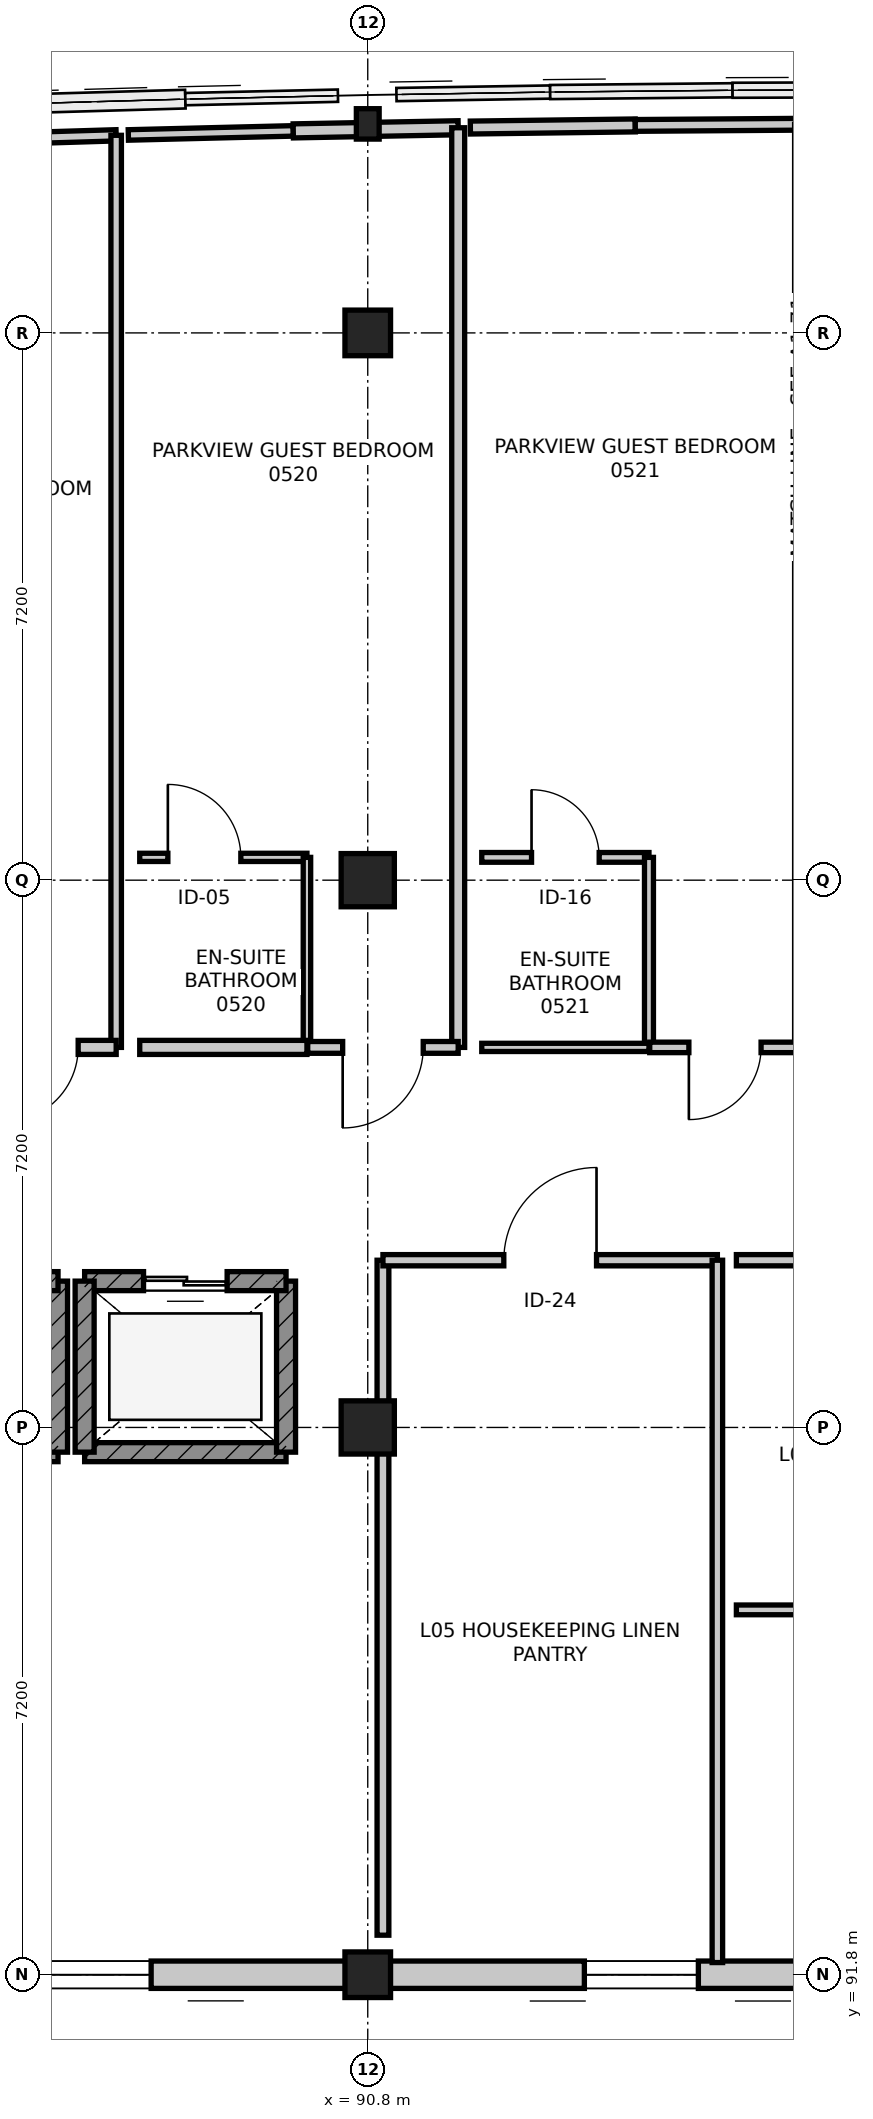
"""IFC4 building model, lengths in metres.
Left out: names, types, materials, properties, quantities, classifications, styles, units other than length and angle.
Written with IfcOpenShell. Run it as: python <this file> out.ifc"""

import sys

from ifc_helpers import new_model, si_unit, direction, frame, frame_2d, origin, origin_2d, place, context, subcontext, project, spatial, rectangle, i_section, extrude, element, fill, save


model = new_model("IFC4")
c1 = context("Model", 3, precision=1e-05, world=origin(), true_north=direction((0.0, 1.0)))
c2 = subcontext(c1, "Body", "Model", "MODEL_VIEW")
j1 = project(units=[si_unit("LENGTHUNIT", "METRE"), si_unit("PLANEANGLEUNIT", "RADIAN")], contexts=[c1])
p1 = place(None, origin())
s1 = spatial("IfcSite", under=j1, at=p1, CompositionType="ELEMENT")
p2 = place(p1, origin())
s2 = spatial("IfcBuilding", under=s1, at=p2, CompositionType="ELEMENT")
p3 = place(p2, frame((0.0, 0.0, 22.8)))
s3 = spatial("IfcBuildingStorey", under=s2, at=p3, CompositionType="ELEMENT", Elevation=22.8)
p4 = place(p3, frame((90.8, 91.8, 0.0), z_axis=(0.0, 0.0, 1.0), x_axis=(1.0, 0.0, 0.0)))
e1 = element("IfcColumn", 1, at=p4, inside=s3, PredefinedType="COLUMN", context=c2, shape_type="SweptSolid", body=[
    extrude(rectangle(XDim=0.6, YDim=0.6, at=origin_2d()), origin(), (0.0, 0.0, 1.0), 3.6),
])
for number, where, z_axis, x_axis in (
    (2, (90.8, 99.0, 0.0), (0.0, 0.0, 1.0), (1.0, 0.0, 0.0)),
    (3, (90.8, 106.2, 0.0), (0.0, 0.0, 1.0), (1.0, 0.0, 0.0)),
):
    element("IfcColumn", number, at=place(p3, frame(where, z_axis=z_axis, x_axis=x_axis)), inside=s3, PredefinedType="COLUMN", context=c2, shape_type="SweptSolid", body=[
        extrude(rectangle(XDim=0.7, YDim=0.7, at=origin_2d()), origin(), (0.0, 0.0, 1.0), 3.6),
    ])
p5 = place(p3, frame((90.8, 113.4, 0.0), z_axis=(0.0, 0.0, 1.0), x_axis=(1.0, 0.0, 0.0)))
e4 = element("IfcColumn", 4, at=p5, inside=s3, PredefinedType="COLUMN", context=c2, shape_type="SweptSolid", body=[
    extrude(rectangle(XDim=0.6, YDim=0.6, at=origin_2d()), origin(), (0.0, 0.0, 1.0), 3.6),
])
p6 = place(p3, frame((90.8, 116.15, 0.0), z_axis=(0.0, 0.0, 1.0), x_axis=(1.0, 0.0, 0.0)))
e5 = element("IfcColumn", 5, at=p6, inside=s3, PredefinedType="COLUMN", context=c2, shape_type="SweptSolid", body=[
    extrude(i_section(OverallWidth=0.3, OverallDepth=0.4, WebThickness=0.013, FlangeThickness=0.024, FilletRadius=0.027, at=origin_2d()), origin(), (0.0, 0.0, 1.0), 3.6),
])
p7 = place(p3, frame((98.0, 91.8, 0.0), z_axis=(0.0, 0.0, 1.0), x_axis=(-1.0, 0.0, 0.0)))
e6 = element("IfcWall", 6, at=p7, inside=s3, PredefinedType="STANDARD", context=c2, shape_type="SweptSolid", body=[
    extrude(rectangle(XDim=7.2, YDim=0.36, at=frame_2d((3.6, 0.0))), origin(), (0.0, 0.0, 1.0), 2.735),
])
p8 = place(p7, frame((2.85, 0.0, 0.75)))
e7 = element("IfcOpeningElement", 7, at=p8, cuts=e6, PredefinedType="OPENING", context=c2, shape_type="SweptSolid", body=[
    extrude(rectangle(XDim=1.5, YDim=1.5, at=frame_2d((0.75, 0.75))), frame((0.0, 0.19, 0.0), z_axis=(0.0, -1.0, 0.0), x_axis=(1.0, 0.0, 0.0)), (0.0, 0.0, 1.0), 0.38),
])
p9 = place(p3, frame((90.8, 91.8, 0.0), z_axis=(0.0, 0.0, 1.0), x_axis=(-1.0, 0.0, 0.0)))
e8 = element("IfcWall", 8, at=p9, inside=s3, PredefinedType="STANDARD", context=c2, shape_type="SweptSolid", body=[
    extrude(rectangle(XDim=7.2, YDim=0.36, at=frame_2d((3.6, 0.0))), origin(), (0.0, 0.0, 1.0), 2.735),
])
p10 = place(p9, frame((2.85, 0.0, 0.75)))
e9 = element("IfcOpeningElement", 9, at=p10, cuts=e8, PredefinedType="OPENING", context=c2, shape_type="SweptSolid", body=[
    extrude(rectangle(XDim=1.5, YDim=1.5, at=frame_2d((0.75, 0.75))), frame((0.0, 0.19, 0.0), z_axis=(0.0, -1.0, 0.0), x_axis=(1.0, 0.0, 0.0)), (0.0, 0.0, 1.0), 0.38),
])
p11 = place(p3, frame((84.075, 98.675, 0.0), z_axis=(0.0, 0.0, 1.0), x_axis=(1.0, 0.0, 0.0)))
e10 = element("IfcWall", 10, at=p11, inside=s3, PredefinedType="SHEAR", context=c2, shape_type="SweptSolid", body=[
    extrude(rectangle(XDim=2.65, YDim=0.25, at=frame_2d((1.325, 0.0))), origin(), (0.0, 0.0, 1.0), 3.35),
])
p12 = place(p3, frame((86.725, 98.675, 0.0), z_axis=(0.0, 0.0, 1.0), x_axis=(0.0, 1.0, 0.0)))
e11 = element("IfcWall", 11, at=p12, inside=s3, PredefinedType="SHEAR", context=c2, shape_type="SweptSolid", body=[
    extrude(rectangle(XDim=2.25, YDim=0.25, at=frame_2d((1.125, 0.0))), origin(), (0.0, 0.0, 1.0), 3.35),
])
p13 = place(p3, frame((86.725, 100.925, 0.0), z_axis=(0.0, 0.0, 1.0), x_axis=(-1.0, 0.0, 0.0)))
e12 = element("IfcWall", 12, at=p13, inside=s3, PredefinedType="SHEAR", context=c2, shape_type="SweptSolid", body=[
    extrude(rectangle(XDim=2.65, YDim=0.25, at=frame_2d((1.325, 0.0))), origin(), (0.0, 0.0, 1.0), 3.35),
])
p14 = place(p13, frame((0.775, 0.0, 0.0)))
e13 = element("IfcOpeningElement", 13, at=p14, cuts=e12, PredefinedType="OPENING", context=c2, shape_type="SweptSolid", body=[
    extrude(rectangle(XDim=1.1, YDim=2.15, at=frame_2d((0.55, 1.075))), frame((0.0, 0.135, 0.0), z_axis=(0.0, -1.0, 0.0), x_axis=(1.0, 0.0, 0.0)), (0.0, 0.0, 1.0), 0.27),
])
p15 = place(p3, frame((87.075, 98.675, 0.0), z_axis=(0.0, 0.0, 1.0), x_axis=(1.0, 0.0, 0.0)))
e14 = element("IfcWall", 14, at=p15, inside=s3, PredefinedType="SHEAR", context=c2, shape_type="SweptSolid", body=[
    extrude(rectangle(XDim=2.65, YDim=0.25, at=frame_2d((1.325, 0.0))), origin(), (0.0, 0.0, 1.0), 3.35),
])
p16 = place(p3, frame((89.725, 98.675, 0.0), z_axis=(0.0, 0.0, 1.0), x_axis=(0.0, 1.0, 0.0)))
e15 = element("IfcWall", 15, at=p16, inside=s3, PredefinedType="SHEAR", context=c2, shape_type="SweptSolid", body=[
    extrude(rectangle(XDim=2.25, YDim=0.25, at=frame_2d((1.125, 0.0))), origin(), (0.0, 0.0, 1.0), 3.35),
])
p17 = place(p3, frame((89.725, 100.925, 0.0), z_axis=(0.0, 0.0, 1.0), x_axis=(-1.0, 0.0, 0.0)))
e16 = element("IfcWall", 16, at=p17, inside=s3, PredefinedType="SHEAR", context=c2, shape_type="SweptSolid", body=[
    extrude(rectangle(XDim=2.65, YDim=0.25, at=frame_2d((1.325, 0.0))), origin(), (0.0, 0.0, 1.0), 3.35),
])
p18 = place(p17, frame((0.775, 0.0, 0.0)))
e17 = element("IfcOpeningElement", 17, at=p18, cuts=e16, PredefinedType="OPENING", context=c2, shape_type="SweptSolid", body=[
    extrude(rectangle(XDim=1.1, YDim=2.15, at=frame_2d((0.55, 1.075))), frame((0.0, 0.135, 0.0), z_axis=(0.0, -1.0, 0.0), x_axis=(1.0, 0.0, 0.0)), (0.0, 0.0, 1.0), 0.27),
])
p19 = place(p3, frame((87.075, 100.925, 0.0), z_axis=(0.0, 0.0, 1.0), x_axis=(0.0, -1.0, 0.0)))
e18 = element("IfcWall", 18, at=p19, inside=s3, PredefinedType="SHEAR", context=c2, shape_type="SweptSolid", body=[
    extrude(rectangle(XDim=2.25, YDim=0.25, at=frame_2d((1.125, 0.0))), origin(), (0.0, 0.0, 1.0), 3.35),
])
p20 = place(p3, frame((91.0, 92.32, 0.0), z_axis=(0.0, 0.0, 1.0), x_axis=(0.0, 1.0, 0.0)))
e19 = element("IfcWall", 19, at=p20, inside=s3, PredefinedType="PARTITIONING", context=c2, shape_type="SweptSolid", body=[
    extrude(rectangle(XDim=8.88, YDim=0.155, at=frame_2d((4.44, 0.0))), origin(), (0.0, 0.0, 1.0), 2.685),
])
p21 = place(p3, frame((91.0, 101.2, 0.0), z_axis=(0.0, 0.0, 1.0), x_axis=(1.0, 0.0, 0.0)))
e20 = element("IfcWall", 20, at=p21, inside=s3, PredefinedType="PARTITIONING", context=c2, shape_type="SweptSolid", body=[
    extrude(rectangle(XDim=4.4, YDim=0.148, at=frame_2d((2.2, 0.0))), origin(), (0.0, 0.0, 1.0), 2.685),
])
p22 = place(p21, frame((1.59, 0.0, 0.0)))
e21 = element("IfcOpeningElement", 21, at=p22, cuts=e20, PredefinedType="OPENING", context=c2, shape_type="SweptSolid", body=[
    extrude(rectangle(XDim=1.22, YDim=2.24, at=frame_2d((0.61, 1.12))), frame((0.0, 0.084, 0.0), z_axis=(0.0, -1.0, 0.0), x_axis=(1.0, 0.0, 0.0)), (0.0, 0.0, 1.0), 0.168),
])
p23 = place(p3, frame((95.4, 101.2, 0.0), z_axis=(0.0, 0.0, 1.0), x_axis=(0.0, -1.0, 0.0)))
e22 = element("IfcWall", 22, at=p23, inside=s3, PredefinedType="PARTITIONING", context=c2, shape_type="SweptSolid", body=[
    extrude(rectangle(XDim=9.24, YDim=0.138, at=frame_2d((4.62, 0.0))), origin(), (0.0, 0.0, 1.0), 2.735),
])
p24 = place(p3, frame((95.65, 101.2, 0.0), z_axis=(0.0, 0.0, 1.0), x_axis=(1.0, 0.0, 0.0)))
e23 = element("IfcWall", 23, at=p24, inside=s3, PredefinedType="PARTITIONING", context=c2, shape_type="SweptSolid", body=[
    extrude(rectangle(XDim=3.25, YDim=0.148, at=frame_2d((1.625, 0.0))), origin(), (0.0, 0.0, 1.0), 2.685),
])
p25 = place(p24, frame((0.945, 0.0, 0.0)))
e24 = element("IfcOpeningElement", 24, at=p25, cuts=e23, PredefinedType="OPENING", context=c2, shape_type="SweptSolid", body=[
    extrude(rectangle(XDim=1.36, YDim=2.22, at=frame_2d((0.68, 1.11))), frame((0.0, 0.084, 0.0), z_axis=(0.0, -1.0, 0.0), x_axis=(1.0, 0.0, 0.0)), (0.0, 0.0, 1.0), 0.168),
])
p26 = place(p3, frame((98.9, 96.6, 0.0), z_axis=(0.0, 0.0, 1.0), x_axis=(-1.0, 0.0, 0.0)))
e25 = element("IfcWall", 25, at=p26, inside=s3, PredefinedType="PARTITIONING", context=c2, shape_type="SweptSolid", body=[
    extrude(rectangle(XDim=3.25, YDim=0.128, at=frame_2d((1.625, 0.0))), origin(), (0.0, 0.0, 1.0), 2.685),
])
p27 = place(p3, frame((85.32, 115.933, 0.0), z_axis=(0.0, 0.0, 1.0), x_axis=(0.999535487068, 0.030476385801, 0.0)))
e26 = element("IfcWall", 26, at=p27, inside=s3, PredefinedType="PARTITIONING", context=c2, shape_type="SweptSolid", body=[
    extrude(rectangle(XDim=2.171, YDim=0.148, at=frame_2d((1.085, 0.0))), origin(), (0.0, 0.0, 1.0), 2.926),
])
p28 = place(p3, frame((87.49, 116.0, 0.0), z_axis=(0.0, 0.0, 1.0), x_axis=(0.0, -1.0, 0.0)))
e27 = element("IfcWall", 27, at=p28, inside=s3, PredefinedType="PARTITIONING", context=c2, shape_type="SweptSolid", body=[
    extrude(rectangle(XDim=12.0, YDim=0.138, at=frame_2d((6.0, 0.0))), origin(), (0.0, 0.0, 1.0), 2.735),
])
p29 = place(p3, frame((87.49, 104.0, 0.0), z_axis=(0.0, 0.0, 1.0), x_axis=(-1.0, 0.0, 0.0)))
e28 = element("IfcWall", 28, at=p29, inside=s3, PredefinedType="PARTITIONING", context=c2, shape_type="SweptSolid", body=[
    extrude(rectangle(XDim=1.98, YDim=0.185, at=frame_2d((0.99, 0.0))), origin(), (0.0, 0.0, 1.0), 3.35),
])
p30 = place(p29, frame((0.5, 0.0, 0.0)))
e29 = element("IfcOpeningElement", 29, at=p30, cuts=e28, PredefinedType="OPENING", context=c2, shape_type="SweptSolid", body=[
    extrude(rectangle(XDim=0.98, YDim=2.15, at=frame_2d((0.49, 1.075))), frame((0.0, 0.103, 0.0), z_axis=(0.0, -1.0, 0.0), x_axis=(1.0, 0.0, 0.0)), (0.0, 0.0, 1.0), 0.205),
])
p31 = place(p3, frame((87.8, 106.5, 0.0), z_axis=(0.0, 0.0, 1.0), x_axis=(1.0, 0.0, 0.0)))
e30 = element("IfcWall", 30, at=p31, inside=s3, PredefinedType="PARTITIONING", context=c2, shape_type="SweptSolid", body=[
    extrude(rectangle(XDim=2.2, YDim=0.108, at=frame_2d((1.1, 0.0))), origin(), (0.0, 0.0, 1.0), 3.35),
])
p32 = place(p31, frame((0.37, 0.0, 0.0)))
e31 = element("IfcOpeningElement", 31, at=p32, cuts=e30, PredefinedType="OPENING", context=c2, shape_type="SweptSolid", body=[
    extrude(rectangle(XDim=0.96, YDim=2.14, at=frame_2d((0.48, 1.07))), frame((0.0, 0.064, 0.0), z_axis=(0.0, -1.0, 0.0), x_axis=(1.0, 0.0, 0.0)), (0.0, 0.0, 1.0), 0.128),
])
p33 = place(p3, frame((90.0, 106.5, 0.0), z_axis=(0.0, 0.0, 1.0), x_axis=(0.0, -1.0, 0.0)))
e32 = element("IfcWall", 32, at=p33, inside=s3, PredefinedType="PARTITIONING", context=c2, shape_type="SweptSolid", body=[
    extrude(rectangle(XDim=2.5, YDim=0.098, at=frame_2d((1.25, 0.0))), origin(), (0.0, 0.0, 1.0), 2.735),
])
p34 = place(p3, frame((90.0, 104.0, 0.0), z_axis=(0.0, 0.0, 1.0), x_axis=(-1.0, 0.0, 0.0)))
e33 = element("IfcWall", 33, at=p34, inside=s3, PredefinedType="PARTITIONING", context=c2, shape_type="SweptSolid", body=[
    extrude(rectangle(XDim=2.2, YDim=0.185, at=frame_2d((1.1, 0.0))), origin(), (0.0, 0.0, 1.0), 3.35),
])
p35 = place(p3, frame((87.65, 116.004, 0.0), z_axis=(0.0, 0.0, 1.0), x_axis=(0.999696642479, 0.024629718158, 0.0)))
e34 = element("IfcWall", 34, at=p35, inside=s3, PredefinedType="PARTITIONING", context=c2, shape_type="SweptSolid", body=[
    extrude(rectangle(XDim=2.171, YDim=0.138, at=frame_2d((1.085, 0.0))), origin(), (0.0, 0.0, 1.0), 2.926),
])
p36 = place(p3, frame((89.82, 116.058, 0.0), z_axis=(0.0, 0.0, 1.0), x_axis=(0.999817130779, 0.019123414968, 0.0)))
e35 = element("IfcWall", 35, at=p36, inside=s3, PredefinedType="PARTITIONING", context=c2, shape_type="SweptSolid", body=[
    extrude(rectangle(XDim=2.17, YDim=0.185, at=frame_2d((1.085, 0.0))), origin(), (0.0, 0.0, 1.0), 2.926),
])
p37 = place(p3, frame((91.99, 116.099, 0.0), z_axis=(0.0, 0.0, 1.0), x_axis=(0.0, -1.0, 0.0)))
e36 = element("IfcWall", 36, at=p37, inside=s3, PredefinedType="PARTITIONING", context=c2, shape_type="SweptSolid", body=[
    extrude(rectangle(XDim=12.099, YDim=0.17, at=frame_2d((6.05, 0.0))), origin(), (0.0, 0.0, 1.0), 2.735),
])
p38 = place(p3, frame((91.99, 104.0, 0.0), z_axis=(0.0, 0.0, 1.0), x_axis=(-1.0, 0.0, 0.0)))
e37 = element("IfcWall", 37, at=p38, inside=s3, PredefinedType="PARTITIONING", context=c2, shape_type="SweptSolid", body=[
    extrude(rectangle(XDim=1.98, YDim=0.155, at=frame_2d((0.99, 0.0))), origin(), (0.0, 0.0, 1.0), 2.685),
])
p39 = place(p38, frame((0.46, 0.0, 0.0)))
e38 = element("IfcOpeningElement", 38, at=p39, cuts=e37, PredefinedType="OPENING", context=c2, shape_type="SweptSolid", body=[
    extrude(rectangle(XDim=1.06, YDim=2.2, at=frame_2d((0.53, 1.1))), frame((0.0, 0.087, 0.0), z_axis=(0.0, -1.0, 0.0), x_axis=(1.0, 0.0, 0.0)), (0.0, 0.0, 1.0), 0.175),
])
p40 = place(p3, frame((92.3, 106.5, 0.0), z_axis=(0.0, 0.0, 1.0), x_axis=(1.0, 0.0, 0.0)))
e39 = element("IfcWall", 39, at=p40, inside=s3, PredefinedType="PARTITIONING", context=c2, shape_type="SweptSolid", body=[
    extrude(rectangle(XDim=2.2, YDim=0.128, at=frame_2d((1.1, 0.0))), origin(), (0.0, 0.0, 1.0), 3.35),
])
p41 = place(p40, frame((0.655, 0.0, 0.0)))
e40 = element("IfcOpeningElement", 40, at=p41, cuts=e39, PredefinedType="OPENING", context=c2, shape_type="SweptSolid", body=[
    extrude(rectangle(XDim=0.89, YDim=2.09, at=frame_2d((0.445, 1.045))), frame((0.0, 0.074, 0.0), z_axis=(0.0, -1.0, 0.0), x_axis=(1.0, 0.0, 0.0)), (0.0, 0.0, 1.0), 0.148),
])
p42 = place(p3, frame((94.5, 106.5, 0.0), z_axis=(0.0, 0.0, 1.0), x_axis=(0.0, -1.0, 0.0)))
e41 = element("IfcWall", 41, at=p42, inside=s3, PredefinedType="PARTITIONING", context=c2, shape_type="SweptSolid", body=[
    extrude(rectangle(XDim=2.5, YDim=0.118, at=frame_2d((1.25, 0.0))), origin(), (0.0, 0.0, 1.0), 2.735),
])
p43 = place(p3, frame((94.5, 104.0, 0.0), z_axis=(0.0, 0.0, 1.0), x_axis=(-1.0, 0.0, 0.0)))
e42 = element("IfcWall", 42, at=p43, inside=s3, PredefinedType="PARTITIONING", context=c2, shape_type="SweptSolid", body=[
    extrude(rectangle(XDim=2.2, YDim=0.108, at=frame_2d((1.1, 0.0))), origin(), (0.0, 0.0, 1.0), 3.35),
])
p44 = place(p3, frame((92.15, 116.102, 0.0), z_axis=(0.0, 0.0, 1.0), x_axis=(0.999916323143, 0.012936255727, 0.0)))
e43 = element("IfcWall", 43, at=p44, inside=s3, PredefinedType="PARTITIONING", context=c2, shape_type="SweptSolid", body=[
    extrude(rectangle(XDim=2.17, YDim=0.17, at=frame_2d((1.085, 0.0))), origin(), (0.0, 0.0, 1.0), 2.926),
])
p45 = place(p3, frame((94.32, 116.13, 0.0), z_axis=(0.0, 0.0, 1.0), x_axis=(0.999974879594, 0.007088030762, 0.0)))
e44 = element("IfcWall", 44, at=p45, inside=s3, PredefinedType="PARTITIONING", context=c2, shape_type="SweptSolid", body=[
    extrude(rectangle(XDim=2.17, YDim=0.155, at=frame_2d((1.085, 0.0))), origin(), (0.0, 0.0, 1.0), 2.926),
])
p46 = place(p3, frame((96.49, 104.0, 0.0), z_axis=(0.0, 0.0, 1.0), x_axis=(-1.0, 0.0, 0.0)))
e45 = element("IfcWall", 45, at=p46, inside=s3, PredefinedType="PARTITIONING", context=c2, shape_type="SweptSolid", body=[
    extrude(rectangle(XDim=1.98, YDim=0.138, at=frame_2d((0.99, 0.0))), origin(), (0.0, 0.0, 1.0), 3.35),
])
p47 = place(p46, frame((0.515, 0.0, 0.0)))
e46 = element("IfcOpeningElement", 46, at=p47, cuts=e45, PredefinedType="OPENING", context=c2, shape_type="SweptSolid", body=[
    extrude(rectangle(XDim=0.95, YDim=2.1, at=frame_2d((0.475, 1.05))), frame((0.0, 0.079, 0.0), z_axis=(0.0, -1.0, 0.0), x_axis=(1.0, 0.0, 0.0)), (0.0, 0.0, 1.0), 0.158),
])
p48 = place(p8, origin())
e47 = element("IfcWindow", 47, at=p48, inside=s3, PartitioningType="SINGLE_PANEL", PredefinedType="WINDOW", context=c2, shape_type="SweptSolid", body=[
    extrude(rectangle(XDim=1.5, YDim=1.5, at=frame_2d((0.75, 0.75))), frame((0.0, 0.03, 0.0), z_axis=(0.0, -1.0, 0.0), x_axis=(1.0, 0.0, 0.0)), (0.0, 0.0, 1.0), 0.06),
])
fill(e7, e47)
p49 = place(p10, origin())
e48 = element("IfcWindow", 48, at=p49, inside=s3, PartitioningType="SINGLE_PANEL", PredefinedType="WINDOW", context=c2, shape_type="SweptSolid", body=[
    extrude(rectangle(XDim=1.5, YDim=1.5, at=frame_2d((0.75, 0.75))), frame((0.0, 0.03, 0.0), z_axis=(0.0, -1.0, 0.0), x_axis=(1.0, 0.0, 0.0)), (0.0, 0.0, 1.0), 0.06),
])
fill(e9, e48)
p50 = place(p18, origin())
e49 = element("IfcDoor", 49, at=p50, inside=s3, OperationType="DOUBLE_DOOR_SLIDING", PredefinedType="DOOR", context=c2, shape_type="SweptSolid", body=[
    extrude(rectangle(XDim=1.1, YDim=2.15, at=frame_2d((0.55, 1.075))), frame((0.0, 0.025, 0.0), z_axis=(0.0, -1.0, 0.0), x_axis=(1.0, 0.0, 0.0)), (0.0, 0.0, 1.0), 0.05),
])
fill(e17, e49)
p51 = place(p22, origin())
e50 = element("IfcDoor", 50, at=p51, inside=s3, OperationType="SINGLE_SWING_RIGHT", PredefinedType="DOOR", context=c2, shape_type="SweptSolid", body=[
    extrude(rectangle(XDim=1.22, YDim=2.24, at=frame_2d((0.61, 1.12))), frame((0.0, 0.025, 0.0), z_axis=(0.0, -1.0, 0.0), x_axis=(1.0, 0.0, 0.0)), (0.0, 0.0, 1.0), 0.05),
])
fill(e21, e50)
p52 = place(p30, origin())
e51 = element("IfcDoor", 51, at=p52, inside=s3, OperationType="SINGLE_SWING_RIGHT", PredefinedType="DOOR", context=c2, shape_type="SweptSolid", body=[
    extrude(rectangle(XDim=0.98, YDim=2.15, at=frame_2d((0.49, 1.075))), frame((0.0, 0.025, 0.0), z_axis=(0.0, -1.0, 0.0), x_axis=(1.0, 0.0, 0.0)), (0.0, 0.0, 1.0), 0.05),
])
fill(e29, e51)
p53 = place(p32, origin())
e52 = element("IfcDoor", 52, at=p53, inside=s3, OperationType="SINGLE_SWING_LEFT", PredefinedType="DOOR", context=c2, shape_type="SweptSolid", body=[
    extrude(rectangle(XDim=0.96, YDim=2.14, at=frame_2d((0.48, 1.07))), frame((0.0, 0.025, 0.0), z_axis=(0.0, -1.0, 0.0), x_axis=(1.0, 0.0, 0.0)), (0.0, 0.0, 1.0), 0.05),
])
fill(e31, e52)
p54 = place(p39, origin())
e53 = element("IfcDoor", 53, at=p54, inside=s3, OperationType="SINGLE_SWING_RIGHT", PredefinedType="DOOR", context=c2, shape_type="SweptSolid", body=[
    extrude(rectangle(XDim=1.06, YDim=2.2, at=frame_2d((0.53, 1.1))), frame((0.0, 0.025, 0.0), z_axis=(0.0, -1.0, 0.0), x_axis=(1.0, 0.0, 0.0)), (0.0, 0.0, 1.0), 0.05),
])
fill(e38, e53)
p55 = place(p41, origin())
e54 = element("IfcDoor", 54, at=p55, inside=s3, OperationType="SINGLE_SWING_LEFT", PredefinedType="DOOR", context=c2, shape_type="SweptSolid", body=[
    extrude(rectangle(XDim=0.89, YDim=2.09, at=frame_2d((0.445, 1.045))), frame((0.0, 0.025, 0.0), z_axis=(0.0, -1.0, 0.0), x_axis=(1.0, 0.0, 0.0)), (0.0, 0.0, 1.0), 0.05),
])
fill(e40, e54)
p56 = place(p47, origin())
e55 = element("IfcDoor", 55, at=p56, inside=s3, OperationType="SINGLE_SWING_RIGHT", PredefinedType="DOOR", context=c2, shape_type="SweptSolid", body=[
    extrude(rectangle(XDim=0.95, YDim=2.1, at=frame_2d((0.475, 1.05))), frame((0.0, 0.025, 0.0), z_axis=(0.0, -1.0, 0.0), x_axis=(1.0, 0.0, 0.0)), (0.0, 0.0, 1.0), 0.05),
])
fill(e46, e55)
save(model, sys.argv[1])
